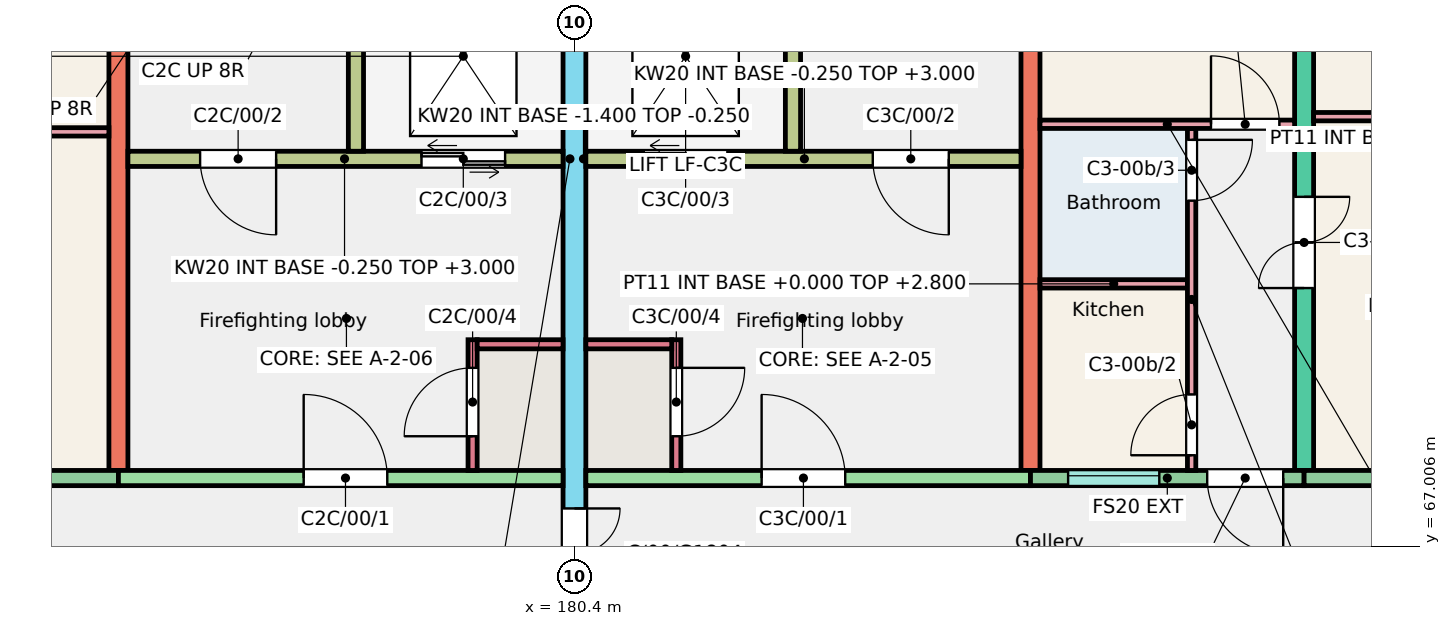
"""IFC4 building model, lengths in metres.
Left out: names, types, materials, properties, quantities, classifications, styles, units other than length and angle.
Written with IfcOpenShell. Run it as: python <this file> out.ifc"""

import sys

from ifc_helpers import new_model, si_unit, direction, frame, frame_2d, origin, place, context, subcontext, project, spatial, rectangle, extrude, element, fill, save


model = new_model("IFC4")
c1 = context("Model", 3, precision=1e-05, world=origin(), true_north=direction((0.0, 1.0)))
c2 = subcontext(c1, "Body", "Model", "MODEL_VIEW")
j1 = project(units=[si_unit("LENGTHUNIT", "METRE"), si_unit("PLANEANGLEUNIT", "RADIAN")], contexts=[c1])
p1 = place(None, origin())
s1 = spatial("IfcSite", under=j1, at=p1, CompositionType="ELEMENT")
p2 = place(p1, origin())
s2 = spatial("IfcBuilding", under=s1, at=p2, CompositionType="ELEMENT")
p3 = place(p2, origin())
s3 = spatial("IfcBuildingStorey", under=s2, at=p3, CompositionType="ELEMENT", Elevation=0.0)
p4 = place(p3, frame((174.4, 68.0, -0.25), z_axis=(0.0, 0.0, 1.0), x_axis=(0.0, 1.0, 0.0)))
e1 = element("IfcWall", 1, at=p4, inside=s3, PredefinedType="SHEAR", context=c2, shape_type="SweptSolid", body=[
    extrude(rectangle(XDim=9.0, YDim=0.25, at=frame_2d((4.5, 0.0))), origin(), (0.0, 0.0, 1.0), 3.25),
])
p5 = place(p3, frame((180.4, 66.0, -0.25), z_axis=(0.0, 0.0, 1.0), x_axis=(0.0, 1.0, 0.0)))
e2 = element("IfcWall", 2, at=p5, inside=s3, PredefinedType="SHEAR", context=c2, shape_type="SweptSolid", body=[
    extrude(rectangle(XDim=11.0, YDim=0.3, at=frame_2d((5.5, 0.0))), origin(), (0.0, 0.0, 1.0), 3.25),
])
p6 = place(p5, frame((0.3, 0.0, 0.25)))
e3 = element("IfcOpeningElement", 3, at=p6, cuts=e2, PredefinedType="OPENING", context=c2, shape_type="SweptSolid", body=[
    extrude(rectangle(XDim=1.2, YDim=2.1, at=frame_2d((0.6, 1.05))), frame((0.0, 0.16, 0.0), z_axis=(0.0, -1.0, 0.0), x_axis=(1.0, 0.0, 0.0)), (0.0, 0.0, 1.0), 0.32),
])
p7 = place(p3, frame((186.4, 68.0, -0.25), z_axis=(0.0, 0.0, 1.0), x_axis=(0.0, 1.0, 0.0)))
e4 = element("IfcWall", 4, at=p7, inside=s3, PredefinedType="SHEAR", context=c2, shape_type="SweptSolid", body=[
    extrude(rectangle(XDim=9.0, YDim=0.25, at=frame_2d((4.5, 0.0))), origin(), (0.0, 0.0, 1.0), 3.25),
])
p8 = place(p3, frame((190.0, 68.0, -0.25), z_axis=(0.0, 0.0, 1.0), x_axis=(0.0, 1.0, 0.0)))
e5 = element("IfcWall", 5, at=p8, inside=s3, PredefinedType="SHEAR", context=c2, shape_type="SweptSolid", body=[
    extrude(rectangle(XDim=9.0, YDim=0.25, at=frame_2d((4.5, 0.0))), origin(), (0.0, 0.0, 1.0), 3.25),
])
p9 = place(p8, frame((2.4, 0.0, 0.25)))
e6 = element("IfcOpeningElement", 6, at=p9, cuts=e5, PredefinedType="OPENING", context=c2, shape_type="SweptSolid", body=[
    extrude(rectangle(XDim=1.2, YDim=2.1, at=frame_2d((0.6, 1.05))), frame((0.0, 0.135, 0.0), z_axis=(0.0, -1.0, 0.0), x_axis=(1.0, 0.0, 0.0)), (0.0, 0.0, 1.0), 0.27),
])
p10 = place(p8, frame((6.4, 0.0, 0.25)))
e7 = element("IfcOpeningElement", 7, at=p10, cuts=e5, PredefinedType="OPENING", context=c2, shape_type="SweptSolid", body=[
    extrude(rectangle(XDim=1.2, YDim=2.1, at=frame_2d((0.6, 1.05))), frame((0.0, 0.135, 0.0), z_axis=(0.0, -1.0, 0.0), x_axis=(1.0, 0.0, 0.0)), (0.0, 0.0, 1.0), 0.27),
])
p11 = place(p3, frame((170.8, 67.9, -0.25), z_axis=(0.0, 0.0, 1.0), x_axis=(1.0, 0.0, 0.0)))
e8 = element("IfcWall", 8, at=p11, inside=s3, PredefinedType="SOLIDWALL", context=c2, shape_type="SweptSolid", body=[
    extrude(rectangle(XDim=3.6, YDim=0.2, at=frame_2d((1.8, 0.0))), origin(), (0.0, 0.0, 1.0), 3.25),
])
p12 = place(p11, frame((1.05, 0.0, 1.15)))
e9 = element("IfcOpeningElement", 9, at=p12, cuts=e8, PredefinedType="OPENING", context=c2, shape_type="SweptSolid", body=[
    extrude(rectangle(XDim=1.5, YDim=1.5, at=frame_2d((0.75, 0.75))), frame((0.0, 0.11, 0.0), z_axis=(0.0, -1.0, 0.0), x_axis=(1.0, 0.0, 0.0)), (0.0, 0.0, 1.0), 0.22),
])
p13 = place(p3, frame((174.4, 67.9, -0.25), z_axis=(0.0, 0.0, 1.0), x_axis=(1.0, 0.0, 0.0)))
e10 = element("IfcWall", 10, at=p13, inside=s3, PredefinedType="SHEAR", context=c2, shape_type="SweptSolid", body=[
    extrude(rectangle(XDim=5.85, YDim=0.2, at=frame_2d((2.925, 0.0))), origin(), (0.0, 0.0, 1.0), 3.25),
])
p14 = place(p13, frame((2.438, 0.0, 0.25)))
e11 = element("IfcOpeningElement", 11, at=p14, cuts=e10, PredefinedType="OPENING", context=c2, shape_type="SweptSolid", body=[
    extrude(rectangle(XDim=1.1, YDim=2.1, at=frame_2d((0.55, 1.05))), frame((0.0, 0.11, 0.0), z_axis=(0.0, -1.0, 0.0), x_axis=(1.0, 0.0, 0.0)), (0.0, 0.0, 1.0), 0.22),
])
p15 = place(p3, frame((174.525, 72.1, -0.25), z_axis=(0.0, 0.0, 1.0), x_axis=(1.0, 0.0, 0.0)))
e12 = element("IfcWall", 12, at=p15, inside=s3, PredefinedType="SHEAR", context=c2, shape_type="SweptSolid", body=[
    extrude(rectangle(XDim=5.725, YDim=0.2, at=frame_2d((2.863, 0.0))), origin(), (0.0, 0.0, 1.0), 3.25),
])
p16 = place(p15, frame((0.95, 0.0, 0.25)))
e13 = element("IfcOpeningElement", 13, at=p16, cuts=e12, PredefinedType="OPENING", context=c2, shape_type="SweptSolid", body=[
    extrude(rectangle(XDim=1.0, YDim=2.1, at=frame_2d((0.5, 1.05))), frame((0.0, 0.11, 0.0), z_axis=(0.0, -1.0, 0.0), x_axis=(1.0, 0.0, 0.0)), (0.0, 0.0, 1.0), 0.22),
])
p17 = place(p15, frame((3.863, 0.0, 0.25)))
e14 = element("IfcOpeningElement", 14, at=p17, cuts=e12, PredefinedType="OPENING", context=c2, shape_type="SweptSolid", body=[
    extrude(rectangle(XDim=1.1, YDim=2.1, at=frame_2d((0.55, 1.05))), frame((0.0, 0.11, 0.0), z_axis=(0.0, -1.0, 0.0), x_axis=(1.0, 0.0, 0.0)), (0.0, 0.0, 1.0), 0.22),
])
p18 = place(p3, frame((177.525, 72.2, -0.25), z_axis=(0.0, 0.0, 1.0), x_axis=(0.0, 1.0, 0.0)))
e15 = element("IfcWall", 15, at=p18, inside=s3, PredefinedType="SHEAR", context=c2, shape_type="SweptSolid", body=[
    extrude(rectangle(XDim=4.8, YDim=0.2, at=frame_2d((2.4, 0.0))), origin(), (0.0, 0.0, 1.0), 3.25),
])
p19 = place(p3, frame((179.06, 68.0, -0.25), z_axis=(0.0, 0.0, 1.0), x_axis=(0.0, 1.0, 0.0)))
e16 = element("IfcWall", 16, at=p19, inside=s3, PredefinedType="SHEAR", context=c2, shape_type="SweptSolid", body=[
    extrude(rectangle(XDim=1.72, YDim=0.12, at=frame_2d((0.86, 0.0))), origin(), (0.0, 0.0, 1.0), 3.25),
])
p20 = place(p19, frame((0.45, 0.0, 0.25)))
e17 = element("IfcOpeningElement", 17, at=p20, cuts=e16, PredefinedType="OPENING", context=c2, shape_type="SweptSolid", body=[
    extrude(rectangle(XDim=0.9, YDim=2.1, at=frame_2d((0.45, 1.05))), frame((0.0, 0.07, 0.0), z_axis=(0.0, -1.0, 0.0), x_axis=(1.0, 0.0, 0.0)), (0.0, 0.0, 1.0), 0.14),
])
p21 = place(p3, frame((179.12, 69.66, -0.25), z_axis=(0.0, 0.0, 1.0), x_axis=(1.0, 0.0, 0.0)))
e18 = element("IfcWall", 18, at=p21, inside=s3, PredefinedType="SHEAR", context=c2, shape_type="SweptSolid", body=[
    extrude(rectangle(XDim=1.13, YDim=0.12, at=frame_2d((0.565, 0.0))), origin(), (0.0, 0.0, 1.0), 3.25),
])
p22 = place(p3, frame((180.55, 67.9, -0.25), z_axis=(0.0, 0.0, 1.0), x_axis=(1.0, 0.0, 0.0)))
e19 = element("IfcWall", 19, at=p22, inside=s3, PredefinedType="SHEAR", context=c2, shape_type="SweptSolid", body=[
    extrude(rectangle(XDim=5.85, YDim=0.2, at=frame_2d((2.925, 0.0))), origin(), (0.0, 0.0, 1.0), 3.25),
])
p23 = place(p22, frame((2.312, 0.0, 0.25)))
e20 = element("IfcOpeningElement", 20, at=p23, cuts=e19, PredefinedType="OPENING", context=c2, shape_type="SweptSolid", body=[
    extrude(rectangle(XDim=1.1, YDim=2.1, at=frame_2d((0.55, 1.05))), frame((0.0, 0.11, 0.0), z_axis=(0.0, -1.0, 0.0), x_axis=(1.0, 0.0, 0.0)), (0.0, 0.0, 1.0), 0.22),
])
p24 = place(p3, frame((180.55, 72.1, -0.25), z_axis=(0.0, 0.0, 1.0), x_axis=(1.0, 0.0, 0.0)))
e21 = element("IfcWall", 21, at=p24, inside=s3, PredefinedType="SHEAR", context=c2, shape_type="SweptSolid", body=[
    extrude(rectangle(XDim=5.725, YDim=0.2, at=frame_2d((2.862, 0.0))), origin(), (0.0, 0.0, 1.0), 3.25),
])
p25 = place(p24, frame((3.775, 0.0, 0.25)))
e22 = element("IfcOpeningElement", 22, at=p25, cuts=e21, PredefinedType="OPENING", context=c2, shape_type="SweptSolid", body=[
    extrude(rectangle(XDim=1.0, YDim=2.1, at=frame_2d((0.5, 1.05))), frame((0.0, 0.11, 0.0), z_axis=(0.0, -1.0, 0.0), x_axis=(1.0, 0.0, 0.0)), (0.0, 0.0, 1.0), 0.22),
])
p26 = place(p24, frame((0.762, 0.0, 0.25)))
e23 = element("IfcOpeningElement", 23, at=p26, cuts=e21, PredefinedType="OPENING", context=c2, shape_type="SweptSolid", body=[
    extrude(rectangle(XDim=1.1, YDim=2.1, at=frame_2d((0.55, 1.05))), frame((0.0, 0.11, 0.0), z_axis=(0.0, -1.0, 0.0), x_axis=(1.0, 0.0, 0.0)), (0.0, 0.0, 1.0), 0.22),
])
p27 = place(p3, frame((183.275, 72.2, -0.25), z_axis=(0.0, 0.0, 1.0), x_axis=(0.0, 1.0, 0.0)))
e24 = element("IfcWall", 24, at=p27, inside=s3, PredefinedType="SHEAR", context=c2, shape_type="SweptSolid", body=[
    extrude(rectangle(XDim=4.8, YDim=0.2, at=frame_2d((2.4, 0.0))), origin(), (0.0, 0.0, 1.0), 3.25),
])
p28 = place(p3, frame((181.74, 68.0, -0.25), z_axis=(0.0, 0.0, 1.0), x_axis=(0.0, 1.0, 0.0)))
e25 = element("IfcWall", 25, at=p28, inside=s3, PredefinedType="SHEAR", context=c2, shape_type="SweptSolid", body=[
    extrude(rectangle(XDim=1.72, YDim=0.12, at=frame_2d((0.86, 0.0))), origin(), (0.0, 0.0, 1.0), 3.25),
])
p29 = place(p28, frame((0.45, 0.0, 0.25)))
e26 = element("IfcOpeningElement", 26, at=p29, cuts=e25, PredefinedType="OPENING", context=c2, shape_type="SweptSolid", body=[
    extrude(rectangle(XDim=0.9, YDim=2.1, at=frame_2d((0.45, 1.05))), frame((0.0, 0.07, 0.0), z_axis=(0.0, -1.0, 0.0), x_axis=(1.0, 0.0, 0.0)), (0.0, 0.0, 1.0), 0.14),
])
p30 = place(p3, frame((180.55, 69.66, -0.25), z_axis=(0.0, 0.0, 1.0), x_axis=(1.0, 0.0, 0.0)))
e27 = element("IfcWall", 27, at=p30, inside=s3, PredefinedType="SHEAR", context=c2, shape_type="SweptSolid", body=[
    extrude(rectangle(XDim=1.13, YDim=0.12, at=frame_2d((0.565, 0.0))), origin(), (0.0, 0.0, 1.0), 3.25),
])
p31 = place(p3, frame((186.4, 67.9, -0.25), z_axis=(0.0, 0.0, 1.0), x_axis=(1.0, 0.0, 0.0)))
e28 = element("IfcWall", 28, at=p31, inside=s3, PredefinedType="SOLIDWALL", context=c2, shape_type="SweptSolid", body=[
    extrude(rectangle(XDim=3.6, YDim=0.2, at=frame_2d((1.8, 0.0))), origin(), (0.0, 0.0, 1.0), 3.25),
])
p32 = place(p31, frame((0.495, 0.0, 1.35)))
e29 = element("IfcOpeningElement", 29, at=p32, cuts=e28, PredefinedType="OPENING", context=c2, shape_type="SweptSolid", body=[
    extrude(rectangle(XDim=1.2, YDim=1.3, at=frame_2d((0.6, 0.65))), frame((0.0, 0.11, 0.0), z_axis=(0.0, -1.0, 0.0), x_axis=(1.0, 0.0, 0.0)), (0.0, 0.0, 1.0), 0.22),
])
p33 = place(p31, frame((2.325, 0.0, 0.25)))
e30 = element("IfcOpeningElement", 30, at=p33, cuts=e28, PredefinedType="OPENING", context=c2, shape_type="SweptSolid", body=[
    extrude(rectangle(XDim=1.0, YDim=2.1, at=frame_2d((0.5, 1.05))), frame((0.0, 0.11, 0.0), z_axis=(0.0, -1.0, 0.0), x_axis=(1.0, 0.0, 0.0)), (0.0, 0.0, 1.0), 0.22),
])
p34 = place(p3, frame((190.0, 67.9, -0.25), z_axis=(0.0, 0.0, 1.0), x_axis=(1.0, 0.0, 0.0)))
e31 = element("IfcWall", 31, at=p34, inside=s3, PredefinedType="SOLIDWALL", context=c2, shape_type="SweptSolid", body=[
    extrude(rectangle(XDim=3.6, YDim=0.2, at=frame_2d((1.8, 0.0))), origin(), (0.0, 0.0, 1.0), 3.25),
])
p35 = place(p34, frame((1.05, 0.0, 1.15)))
e32 = element("IfcOpeningElement", 32, at=p35, cuts=e31, PredefinedType="OPENING", context=c2, shape_type="SweptSolid", body=[
    extrude(rectangle(XDim=1.5, YDim=1.5, at=frame_2d((0.75, 0.75))), frame((0.0, 0.11, 0.0), z_axis=(0.0, -1.0, 0.0), x_axis=(1.0, 0.0, 0.0)), (0.0, 0.0, 1.0), 0.22),
])
p36 = place(p3, frame((177.425, 72.1, -1.4), z_axis=(0.0, 0.0, 1.0), x_axis=(1.0, 0.0, 0.0)))
e33 = element("IfcWall", 33, at=p36, inside=s3, PredefinedType="SHEAR", context=c2, shape_type="SweptSolid", body=[
    extrude(rectangle(XDim=2.975, YDim=0.2, at=frame_2d((1.487, 0.0))), origin(), (0.0, 0.0, 1.0), 1.15),
])
p37 = place(p3, frame((177.525, 72.2, -1.4), z_axis=(0.0, 0.0, 1.0), x_axis=(0.0, 1.0, 0.0)))
e34 = element("IfcWall", 34, at=p37, inside=s3, PredefinedType="SHEAR", context=c2, shape_type="SweptSolid", body=[
    extrude(rectangle(XDim=3.0, YDim=0.2, at=frame_2d((1.5, 0.0))), origin(), (0.0, 0.0, 1.0), 1.15),
])
p38 = place(p3, frame((180.325, 72.2, -1.4), z_axis=(0.0, 0.0, 1.0), x_axis=(0.0, 1.0, 0.0)))
e35 = element("IfcWall", 35, at=p38, inside=s3, PredefinedType="SHEAR", context=c2, shape_type="SweptSolid", body=[
    extrude(rectangle(XDim=3.0, YDim=0.15, at=frame_2d((1.5, 0.0))), origin(), (0.0, 0.0, 1.0), 1.15),
])
p39 = place(p3, frame((180.4, 72.1, -1.4), z_axis=(0.0, 0.0, 1.0), x_axis=(1.0, 0.0, 0.0)))
e36 = element("IfcWall", 36, at=p39, inside=s3, PredefinedType="SHEAR", context=c2, shape_type="SweptSolid", body=[
    extrude(rectangle(XDim=2.975, YDim=0.2, at=frame_2d((1.488, 0.0))), origin(), (0.0, 0.0, 1.0), 1.15),
])
p40 = place(p3, frame((183.275, 72.2, -1.4), z_axis=(0.0, 0.0, 1.0), x_axis=(0.0, 1.0, 0.0)))
e37 = element("IfcWall", 37, at=p40, inside=s3, PredefinedType="SHEAR", context=c2, shape_type="SweptSolid", body=[
    extrude(rectangle(XDim=3.0, YDim=0.2, at=frame_2d((1.5, 0.0))), origin(), (0.0, 0.0, 1.0), 1.15),
])
p41 = place(p3, frame((180.475, 72.2, -1.4), z_axis=(0.0, 0.0, 1.0), x_axis=(0.0, 1.0, 0.0)))
e38 = element("IfcWall", 38, at=p41, inside=s3, PredefinedType="SHEAR", context=c2, shape_type="SweptSolid", body=[
    extrude(rectangle(XDim=3.0, YDim=0.15, at=frame_2d((1.5, 0.0))), origin(), (0.0, 0.0, 1.0), 1.15),
])
p42 = place(p3, frame((170.925, 72.455, 0.0), z_axis=(0.0, 0.0, 1.0), x_axis=(1.0, 0.0, 0.0)))
e39 = element("IfcWall", 39, at=p42, inside=s3, PredefinedType="PARTITIONING", context=c2, shape_type="SweptSolid", body=[
    extrude(rectangle(XDim=3.35, YDim=0.11, at=frame_2d((1.675, 0.0))), origin(), (0.0, 0.0, 1.0), 2.8),
])
p43 = place(p3, frame((186.525, 70.455, 0.0), z_axis=(0.0, 0.0, 1.0), x_axis=(1.0, 0.0, 0.0)))
e40 = element("IfcWall", 40, at=p43, inside=s3, PredefinedType="PARTITIONING", context=c2, shape_type="SweptSolid", body=[
    extrude(rectangle(XDim=1.94, YDim=0.11, at=frame_2d((0.97, 0.0))), origin(), (0.0, 0.0, 1.0), 2.8),
])
p44 = place(p3, frame((188.52, 68.0, 0.0), z_axis=(0.0, 0.0, 1.0), x_axis=(0.0, 1.0, 0.0)))
e41 = element("IfcWall", 41, at=p44, inside=s3, PredefinedType="PARTITIONING", context=c2, shape_type="SweptSolid", body=[
    extrude(rectangle(XDim=4.5, YDim=0.11, at=frame_2d((2.25, 0.0))), origin(), (0.0, 0.0, 1.0), 2.8),
])
p45 = place(p44, frame((0.2, 0.0, 0.0)))
e42 = element("IfcOpeningElement", 42, at=p45, cuts=e41, PredefinedType="OPENING", context=c2, shape_type="SweptSolid", body=[
    extrude(rectangle(XDim=0.8, YDim=2.1, at=frame_2d((0.4, 1.05))), frame((0.0, 0.065, 0.0), z_axis=(0.0, -1.0, 0.0), x_axis=(1.0, 0.0, 0.0)), (0.0, 0.0, 1.0), 0.13),
])
p46 = place(p44, frame((3.55, 0.0, 0.0)))
e43 = element("IfcOpeningElement", 43, at=p46, cuts=e41, PredefinedType="OPENING", context=c2, shape_type="SweptSolid", body=[
    extrude(rectangle(XDim=0.8, YDim=2.1, at=frame_2d((0.4, 1.05))), frame((0.0, 0.065, 0.0), z_axis=(0.0, -1.0, 0.0), x_axis=(1.0, 0.0, 0.0)), (0.0, 0.0, 1.0), 0.13),
])
p47 = place(p3, frame((186.525, 72.555, 0.0), z_axis=(0.0, 0.0, 1.0), x_axis=(1.0, 0.0, 0.0)))
e44 = element("IfcWall", 44, at=p47, inside=s3, PredefinedType="PARTITIONING", context=c2, shape_type="SweptSolid", body=[
    extrude(rectangle(XDim=3.35, YDim=0.11, at=frame_2d((1.675, 0.0))), origin(), (0.0, 0.0, 1.0), 2.8),
])
p48 = place(p47, frame((2.25, 0.0, 0.0)))
e45 = element("IfcOpeningElement", 45, at=p48, cuts=e44, PredefinedType="OPENING", context=c2, shape_type="SweptSolid", body=[
    extrude(rectangle(XDim=0.9, YDim=2.1, at=frame_2d((0.45, 1.05))), frame((0.0, 0.065, 0.0), z_axis=(0.0, -1.0, 0.0), x_axis=(1.0, 0.0, 0.0)), (0.0, 0.0, 1.0), 0.13),
])
p49 = place(p3, frame((190.125, 72.655, 0.0), z_axis=(0.0, 0.0, 1.0), x_axis=(1.0, 0.0, 0.0)))
e46 = element("IfcWall", 46, at=p49, inside=s3, PredefinedType="PARTITIONING", context=c2, shape_type="SweptSolid", body=[
    extrude(rectangle(XDim=3.35, YDim=0.11, at=frame_2d((1.675, 0.0))), origin(), (0.0, 0.0, 1.0), 2.8),
])
p50 = place(p32, origin())
e47 = element("IfcWindow", 47, at=p50, inside=s3, PartitioningType="SINGLE_PANEL", PredefinedType="WINDOW", context=c2, shape_type="SweptSolid", body=[
    extrude(rectangle(XDim=1.2, YDim=1.3, at=frame_2d((0.6, 0.65))), frame((0.0, 0.06, 0.0), z_axis=(0.0, -1.0, 0.0), x_axis=(1.0, 0.0, 0.0)), (0.0, 0.0, 1.0), 0.06),
])
fill(e29, e47)
p51 = place(p33, origin())
e48 = element("IfcDoor", 48, at=p51, inside=s3, OperationType="SINGLE_SWING_RIGHT", PredefinedType="DOOR", context=c2, shape_type="SweptSolid", body=[
    extrude(rectangle(XDim=1.0, YDim=2.1, at=frame_2d((0.5, 1.05))), frame((0.0, 0.025, 0.0), z_axis=(0.0, -1.0, 0.0), x_axis=(1.0, 0.0, 0.0)), (0.0, 0.0, 1.0), 0.05),
])
fill(e30, e48)
p52 = place(p45, origin())
e49 = element("IfcDoor", 49, at=p52, inside=s3, OperationType="SINGLE_SWING_LEFT", PredefinedType="DOOR", context=c2, shape_type="SweptSolid", body=[
    extrude(rectangle(XDim=0.8, YDim=2.1, at=frame_2d((0.4, 1.05))), frame((0.0, 0.025, 0.0), z_axis=(0.0, -1.0, 0.0), x_axis=(1.0, 0.0, 0.0)), (0.0, 0.0, 1.0), 0.05),
])
fill(e42, e49)
p53 = place(p46, origin())
e50 = element("IfcDoor", 50, at=p53, inside=s3, OperationType="SINGLE_SWING_RIGHT", PredefinedType="DOOR", context=c2, shape_type="SweptSolid", body=[
    extrude(rectangle(XDim=0.8, YDim=2.1, at=frame_2d((0.4, 1.05))), frame((0.0, 0.025, 0.0), z_axis=(0.0, -1.0, 0.0), x_axis=(1.0, 0.0, 0.0)), (0.0, 0.0, 1.0), 0.05),
])
fill(e43, e50)
p54 = place(p48, origin())
e51 = element("IfcDoor", 51, at=p54, inside=s3, OperationType="SINGLE_SWING_LEFT", PredefinedType="DOOR", context=c2, shape_type="SweptSolid", body=[
    extrude(rectangle(XDim=0.9, YDim=2.1, at=frame_2d((0.45, 1.05))), frame((0.0, 0.025, 0.0), z_axis=(0.0, -1.0, 0.0), x_axis=(1.0, 0.0, 0.0)), (0.0, 0.0, 1.0), 0.05),
])
fill(e45, e51)
p55 = place(p9, origin())
e52 = element("IfcDoor", 52, at=p55, inside=s3, OperationType="DOUBLE_DOOR_SINGLE_SWING", PredefinedType="DOOR", context=c2, shape_type="SweptSolid", body=[
    extrude(rectangle(XDim=1.2, YDim=2.1, at=frame_2d((0.6, 1.05))), frame((0.0, 0.025, 0.0), z_axis=(0.0, -1.0, 0.0), x_axis=(1.0, 0.0, 0.0)), (0.0, 0.0, 1.0), 0.05),
])
fill(e6, e52)
p56 = place(p14, origin())
e53 = element("IfcDoor", 53, at=p56, inside=s3, OperationType="SINGLE_SWING_LEFT", PredefinedType="DOOR", context=c2, shape_type="SweptSolid", body=[
    extrude(rectangle(XDim=1.1, YDim=2.1, at=frame_2d((0.55, 1.05))), frame((0.0, 0.025, 0.0), z_axis=(0.0, -1.0, 0.0), x_axis=(1.0, 0.0, 0.0)), (0.0, 0.0, 1.0), 0.05),
])
fill(e11, e53)
p57 = place(p16, origin())
e54 = element("IfcDoor", 54, at=p57, inside=s3, OperationType="SINGLE_SWING_RIGHT", PredefinedType="DOOR", context=c2, shape_type="SweptSolid", body=[
    extrude(rectangle(XDim=1.0, YDim=2.1, at=frame_2d((0.5, 1.05))), frame((0.0, 0.025, 0.0), z_axis=(0.0, -1.0, 0.0), x_axis=(1.0, 0.0, 0.0)), (0.0, 0.0, 1.0), 0.05),
])
fill(e13, e54)
p58 = place(p17, origin())
e55 = element("IfcDoor", 55, at=p58, inside=s3, OperationType="DOUBLE_DOOR_SLIDING", PredefinedType="DOOR", context=c2, shape_type="SweptSolid", body=[
    extrude(rectangle(XDim=1.1, YDim=2.1, at=frame_2d((0.55, 1.05))), frame((0.0, 0.025, 0.0), z_axis=(0.0, -1.0, 0.0), x_axis=(1.0, 0.0, 0.0)), (0.0, 0.0, 1.0), 0.05),
])
fill(e14, e55)
p59 = place(p20, origin())
e56 = element("IfcDoor", 56, at=p59, inside=s3, OperationType="SINGLE_SWING_LEFT", PredefinedType="DOOR", context=c2, shape_type="SweptSolid", body=[
    extrude(rectangle(XDim=0.9, YDim=2.1, at=frame_2d((0.45, 1.05))), frame((0.0, 0.025, 0.0), z_axis=(0.0, -1.0, 0.0), x_axis=(1.0, 0.0, 0.0)), (0.0, 0.0, 1.0), 0.05),
])
fill(e17, e56)
p60 = place(p23, origin())
e57 = element("IfcDoor", 57, at=p60, inside=s3, OperationType="SINGLE_SWING_LEFT", PredefinedType="DOOR", context=c2, shape_type="SweptSolid", body=[
    extrude(rectangle(XDim=1.1, YDim=2.1, at=frame_2d((0.55, 1.05))), frame((0.0, 0.025, 0.0), z_axis=(0.0, -1.0, 0.0), x_axis=(1.0, 0.0, 0.0)), (0.0, 0.0, 1.0), 0.05),
])
fill(e20, e57)
p61 = place(p25, origin())
e58 = element("IfcDoor", 58, at=p61, inside=s3, OperationType="SINGLE_SWING_RIGHT", PredefinedType="DOOR", context=c2, shape_type="SweptSolid", body=[
    extrude(rectangle(XDim=1.0, YDim=2.1, at=frame_2d((0.5, 1.05))), frame((0.0, 0.025, 0.0), z_axis=(0.0, -1.0, 0.0), x_axis=(1.0, 0.0, 0.0)), (0.0, 0.0, 1.0), 0.05),
])
fill(e22, e58)
p62 = place(p26, origin())
e59 = element("IfcDoor", 59, at=p62, inside=s3, OperationType="DOUBLE_DOOR_SLIDING", PredefinedType="DOOR", context=c2, shape_type="SweptSolid", body=[
    extrude(rectangle(XDim=1.1, YDim=2.1, at=frame_2d((0.55, 1.05))), frame((0.0, 0.025, 0.0), z_axis=(0.0, -1.0, 0.0), x_axis=(1.0, 0.0, 0.0)), (0.0, 0.0, 1.0), 0.05),
])
fill(e23, e59)
p63 = place(p29, origin())
e60 = element("IfcDoor", 60, at=p63, inside=s3, OperationType="SINGLE_SWING_RIGHT", PredefinedType="DOOR", context=c2, shape_type="SweptSolid", body=[
    extrude(rectangle(XDim=0.9, YDim=2.1, at=frame_2d((0.45, 1.05))), frame((0.0, 0.025, 0.0), z_axis=(0.0, -1.0, 0.0), x_axis=(1.0, 0.0, 0.0)), (0.0, 0.0, 1.0), 0.05),
])
fill(e26, e60)
p64 = place(p6, origin())
e61 = element("IfcDoor", 61, at=p64, inside=s3, OperationType="DOUBLE_DOOR_SINGLE_SWING", PredefinedType="DOOR", context=c2, shape_type="SweptSolid", body=[
    extrude(rectangle(XDim=1.2, YDim=2.1, at=frame_2d((0.6, 1.05))), frame((0.0, 0.025, 0.0), z_axis=(0.0, -1.0, 0.0), x_axis=(1.0, 0.0, 0.0)), (0.0, 0.0, 1.0), 0.05),
])
fill(e3, e61)
save(model, sys.argv[1])
